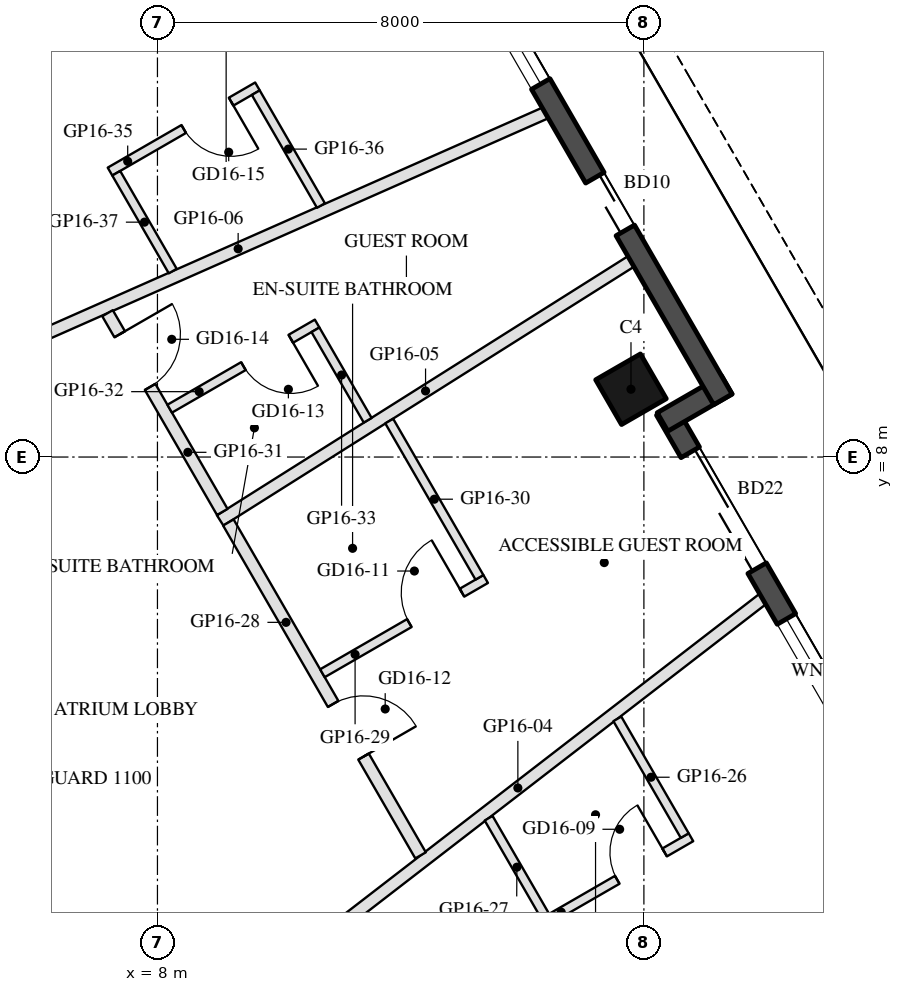
"""IFC4 building model, lengths in metres.
Left out: names, types, materials, properties, quantities, classifications, styles, units other than length and angle.
Written with IfcOpenShell. Run it as: python <this file> out.ifc"""

import sys

from ifc_helpers import new_model, si_unit, direction, frame, frame_2d, origin, origin_2d, place, context, subcontext, project, spatial, rectangle, hollow_rectangle, extrude, element, fill, save


model = new_model("IFC4")
c1 = context("Model", 3, precision=1e-05, world=origin(), true_north=direction((0.0, 1.0)))
c2 = subcontext(c1, "Body", "Model", "MODEL_VIEW")
j1 = project(units=[si_unit("LENGTHUNIT", "METRE"), si_unit("PLANEANGLEUNIT", "RADIAN")], contexts=[c1])
p1 = place(None, origin())
s1 = spatial("IfcSite", under=j1, at=p1, CompositionType="ELEMENT")
p2 = place(p1, origin())
s2 = spatial("IfcBuilding", under=s1, at=p2, CompositionType="ELEMENT")
p3 = place(p2, frame((0.0, 0.0, 179.9)))
s3 = spatial("IfcBuildingStorey", under=s2, at=p3, CompositionType="ELEMENT", Elevation=179.9)
p4 = place(p3, frame((15.788, 9.115, 0.0), z_axis=(0.0, 0.0, 1.0), x_axis=(-0.5, 0.866025403784, 0.0)))
e1 = element("IfcColumn", 1, at=p4, inside=s3, PredefinedType="COLUMN", context=c2, shape_type="SweptSolid", body=[
    extrude(hollow_rectangle(XDim=0.85, YDim=0.85, WallThickness=0.04, at=origin_2d()), origin(), (0.0, 0.0, 1.0), 3.7),
])
p5 = place(p3, frame((19.729, 2.938, 0.0), z_axis=(0.0, 0.0, 1.0), x_axis=(-0.499976430342, 0.866039011305, 0.0)))
e2 = element("IfcWall", 2, at=p5, inside=s3, PredefinedType="SOLIDWALL", context=c2, shape_type="SweptSolid", body=[
    extrude(rectangle(XDim=6.74, YDim=0.35, at=frame_2d((3.37, 0.0))), origin(), (0.0, 0.0, 1.0), 3.55),
])
p6 = place(p5, frame((0.77, 0.0, 0.3)))
e3 = element("IfcOpeningElement", 3, at=p6, cuts=e2, PredefinedType="OPENING", context=c2, shape_type="SweptSolid", body=[
    extrude(rectangle(XDim=2.0, YDim=2.65, at=frame_2d((1.0, 1.325))), frame((0.0, 0.185, 0.0), z_axis=(0.0, -1.0, 0.0), x_axis=(1.0, 0.0, 0.0)), (0.0, 0.0, 1.0), 0.37),
])
p7 = place(p5, frame((3.734, 0.0, 0.0)))
e4 = element("IfcOpeningElement", 4, at=p7, cuts=e2, PredefinedType="OPENING", context=c2, shape_type="SweptSolid", body=[
    extrude(rectangle(XDim=2.2, YDim=2.4, at=frame_2d((1.1, 1.2))), frame((0.0, 0.185, 0.0), z_axis=(0.0, -1.0, 0.0), x_axis=(1.0, 0.0, 0.0)), (0.0, 0.0, 1.0), 0.37),
])
p8 = place(p3, frame((16.306, 8.577, 0.0), z_axis=(0.0, 0.0, 1.0), x_axis=(0.866092288191, 0.499884134912, 0.0)))
e5 = element("IfcWall", 5, at=p8, inside=s3, PredefinedType="SOLIDWALL", context=c2, shape_type="SweptSolid", body=[
    extrude(rectangle(XDim=1.22, YDim=0.35, at=frame_2d((0.61, 0.0))), origin(), (0.0, 0.0, 1.0), 3.55),
])
p9 = place(p3, frame((17.299, 8.948, 0.0), z_axis=(0.0, 0.0, 1.0), x_axis=(-0.500010041276, 0.866019606374, 0.0)))
e6 = element("IfcWall", 6, at=p9, inside=s3, PredefinedType="SOLIDWALL", context=c2, shape_type="SweptSolid", body=[
    extrude(rectangle(XDim=9.7, YDim=0.35, at=frame_2d((4.85, 0.0))), origin(), (0.0, 0.0, 1.0), 3.55),
])
p10 = place(p9, frame((3.21, 0.0, 0.0)))
e7 = element("IfcOpeningElement", 7, at=p10, cuts=e6, PredefinedType="OPENING", context=c2, shape_type="SweptSolid", body=[
    extrude(rectangle(XDim=1.0, YDim=2.4, at=frame_2d((0.5, 1.2))), frame((0.0, 0.185, 0.0), z_axis=(0.0, -1.0, 0.0), x_axis=(1.0, 0.0, 0.0)), (0.0, 0.0, 1.0), 0.37),
])
p11 = place(p9, frame((5.99, 0.0, 0.3)))
e8 = element("IfcOpeningElement", 8, at=p11, cuts=e6, PredefinedType="OPENING", context=c2, shape_type="SweptSolid", body=[
    extrude(rectangle(XDim=2.0, YDim=2.65, at=frame_2d((1.0, 1.325))), frame((0.0, 0.185, 0.0), z_axis=(0.0, -1.0, 0.0), x_axis=(1.0, 0.0, 0.0)), (0.0, 0.0, 1.0), 0.37),
])
p12 = place(p3, frame((17.953, 5.664, 0.0), z_axis=(0.0, 0.0, 1.0), x_axis=(-0.791642262136, -0.610984884264, 0.0)))
e9 = element("IfcWall", 9, at=p12, inside=s3, PredefinedType="PARTITIONING", context=c2, shape_type="SweptSolid", body=[
    extrude(rectangle(XDim=10.171, YDim=0.2, at=frame_2d((5.085, 0.0))), origin(), (0.0, 0.0, 1.0), 2.95),
])
p13 = place(p3, frame((15.787, 11.216, 0.0), z_axis=(0.0, 0.0, 1.0), x_axis=(-0.845894721315, -0.533349904332, 0.0)))
e10 = element("IfcWall", 10, at=p13, inside=s3, PredefinedType="PARTITIONING", context=c2, shape_type="SweptSolid", body=[
    extrude(rectangle(XDim=7.986, YDim=0.2, at=frame_2d((3.993, 0.0))), origin(), (0.0, 0.0, 1.0), 3.06),
])
p14 = place(p3, frame((14.377, 13.658, 0.0), z_axis=(0.0, 0.0, 1.0), x_axis=(-0.914546661299, -0.404480412762, 0.0)))
e11 = element("IfcWall", 11, at=p14, inside=s3, PredefinedType="PARTITIONING", context=c2, shape_type="SweptSolid", body=[
    extrude(rectangle(XDim=11.043, YDim=0.2, at=frame_2d((5.521, 0.0))), origin(), (0.0, 0.0, 1.0), 3.06),
])
p15 = place(p3, frame((14.349, 0.347, 0.0), z_axis=(0.0, 0.0, 1.0), x_axis=(0.866034573852, 0.49998411664, 0.0)))
e12 = element("IfcWall", 12, at=p15, inside=s3, PredefinedType="PARTITIONING", context=c2, shape_type="SweptSolid", body=[
    extrude(rectangle(XDim=2.8, YDim=0.15, at=frame_2d((1.4, 0.0))), origin(), (0.0, 0.0, 1.0), 3.55),
])
p16 = place(p15, frame((1.4, 0.0, 0.0)))
e13 = element("IfcOpeningElement", 13, at=p16, cuts=e12, PredefinedType="OPENING", context=c2, shape_type="SweptSolid", body=[
    extrude(rectangle(XDim=0.9, YDim=2.1, at=frame_2d((0.45, 1.05))), frame((0.0, 0.085, 0.0), z_axis=(0.0, -1.0, 0.0), x_axis=(1.0, 0.0, 0.0)), (0.0, 0.0, 1.0), 0.17),
])
p17 = place(p3, frame((16.671, 1.774, 0.0), z_axis=(0.0, 0.0, 1.0), x_axis=(-0.499941746681, 0.866059033742, 0.0)))
e14 = element("IfcWall", 14, at=p17, inside=s3, PredefinedType="PARTITIONING", context=c2, shape_type="SweptSolid", body=[
    extrude(rectangle(XDim=2.217, YDim=0.15, at=frame_2d((1.108, 0.0))), origin(), (0.0, 0.0, 1.0), 3.55),
])
p18 = place(p3, frame((14.377, 0.449, 0.0), z_axis=(0.0, 0.0, 1.0), x_axis=(-0.500063286585, 0.865988862174, 0.0)))
e15 = element("IfcWall", 15, at=p18, inside=s3, PredefinedType="PARTITIONING", context=c2, shape_type="SweptSolid", body=[
    extrude(rectangle(XDim=1.86, YDim=0.15, at=frame_2d((0.93, 0.0))), origin(), (0.0, 0.0, 1.0), 3.55),
])
p19 = place(p3, frame((9.166, 6.924, 0.0), z_axis=(0.0, 0.0, 1.0), x_axis=(0.499997689051, -0.866026738007, 0.0)))
e16 = element("IfcWall", 16, at=p19, inside=s3, PredefinedType="PARTITIONING", context=c2, shape_type="SweptSolid", body=[
    extrude(rectangle(XDim=6.322, YDim=0.2, at=frame_2d((3.161, 0.0))), origin(), (0.0, 0.0, 1.0), 2.95),
])
p20 = place(p19, frame((3.446, 0.0, 0.0)))
e17 = element("IfcOpeningElement", 17, at=p20, cuts=e16, PredefinedType="OPENING", context=c2, shape_type="SweptSolid", body=[
    extrude(rectangle(XDim=1.0, YDim=2.1, at=frame_2d((0.5, 1.05))), frame((0.0, 0.11, 0.0), z_axis=(0.0, -1.0, 0.0), x_axis=(1.0, 0.0, 0.0)), (0.0, 0.0, 1.0), 0.22),
])
p21 = place(p3, frame((10.713, 4.444, 0.0), z_axis=(0.0, 0.0, 1.0), x_axis=(0.86602952684, 0.49999285859, 0.0)))
e18 = element("IfcWall", 18, at=p21, inside=s3, PredefinedType="PARTITIONING", context=c2, shape_type="SweptSolid", body=[
    extrude(rectangle(XDim=3.1, YDim=0.15, at=frame_2d((1.55, 0.0))), origin(), (0.0, 0.0, 1.0), 3.55),
])
p22 = place(p21, frame((1.65, 0.0, 0.0)))
e19 = element("IfcOpeningElement", 19, at=p22, cuts=e18, PredefinedType="OPENING", context=c2, shape_type="SweptSolid", body=[
    extrude(rectangle(XDim=1.0, YDim=2.1, at=frame_2d((0.5, 1.05))), frame((0.0, 0.085, 0.0), z_axis=(0.0, -1.0, 0.0), x_axis=(1.0, 0.0, 0.0)), (0.0, 0.0, 1.0), 0.17),
])
p23 = place(p3, frame((13.296, 6.021, 0.0), z_axis=(0.0, 0.0, 1.0), x_axis=(-0.499978799242, 0.866037643702, 0.0)))
e20 = element("IfcWall", 20, at=p23, inside=s3, PredefinedType="PARTITIONING", context=c2, shape_type="SweptSolid", body=[
    extrude(rectangle(XDim=2.968, YDim=0.15, at=frame_2d((1.484, 0.0))), origin(), (0.0, 0.0, 1.0), 2.95),
])
p24 = place(p3, frame((7.179, 10.365, 0.0), z_axis=(0.0, 0.0, 1.0), x_axis=(0.500021083992, -0.866013230594, 0.0)))
e21 = element("IfcWall", 21, at=p24, inside=s3, PredefinedType="PARTITIONING", context=c2, shape_type="SweptSolid", body=[
    extrude(rectangle(XDim=3.774, YDim=0.2, at=frame_2d((1.887, 0.0))), origin(), (0.0, 0.0, 1.0), 2.95),
])
p25 = place(p24, frame((0.4, 0.0, 0.0)))
e22 = element("IfcOpeningElement", 22, at=p25, cuts=e21, PredefinedType="OPENING", context=c2, shape_type="SweptSolid", body=[
    extrude(rectangle(XDim=1.0, YDim=2.1, at=frame_2d((0.5, 1.05))), frame((0.0, 0.11, 0.0), z_axis=(0.0, -1.0, 0.0), x_axis=(1.0, 0.0, 0.0)), (0.0, 0.0, 1.0), 0.22),
])
p26 = place(p3, frame((10.626, 10.195, 0.0), z_axis=(0.0, 0.0, 1.0), x_axis=(-0.865996816683, -0.500049511043, 0.0)))
e23 = element("IfcWall", 23, at=p26, inside=s3, PredefinedType="PARTITIONING", context=c2, shape_type="SweptSolid", body=[
    extrude(rectangle(XDim=2.8, YDim=0.15, at=frame_2d((1.4, 0.0))), origin(), (0.0, 0.0, 1.0), 3.55),
])
p27 = place(p26, frame((0.5, 0.0, 0.0)))
e24 = element("IfcOpeningElement", 24, at=p27, cuts=e23, PredefinedType="OPENING", context=c2, shape_type="SweptSolid", body=[
    extrude(rectangle(XDim=0.9, YDim=2.1, at=frame_2d((0.45, 1.05))), frame((0.0, 0.085, 0.0), z_axis=(0.0, -1.0, 0.0), x_axis=(1.0, 0.0, 0.0)), (0.0, 0.0, 1.0), 0.17),
])
p28 = place(p3, frame((11.458, 8.605, 0.0), z_axis=(0.0, 0.0, 1.0), x_axis=(-0.499898763811, 0.866083844636, 0.0)))
e25 = element("IfcWall", 25, at=p28, inside=s3, PredefinedType="PARTITIONING", context=c2, shape_type="SweptSolid", body=[
    extrude(rectangle(XDim=1.718, YDim=0.15, at=frame_2d((0.859, 0.0))), origin(), (0.0, 0.0, 1.0), 3.55),
])
p29 = place(p3, frame((9.645, 14.095, 0.0), z_axis=(0.0, 0.0, 1.0), x_axis=(-0.865996816683, -0.500049511043, 0.0)))
e26 = element("IfcWall", 26, at=p29, inside=s3, PredefinedType="PARTITIONING", context=c2, shape_type="SweptSolid", body=[
    extrude(rectangle(XDim=2.8, YDim=0.15, at=frame_2d((1.4, 0.0))), origin(), (0.0, 0.0, 1.0), 3.55),
])
p30 = place(p29, frame((0.5, 0.0, 0.0)))
e27 = element("IfcOpeningElement", 27, at=p30, cuts=e26, PredefinedType="OPENING", context=c2, shape_type="SweptSolid", body=[
    extrude(rectangle(XDim=0.9, YDim=2.1, at=frame_2d((0.45, 1.05))), frame((0.0, 0.085, 0.0), z_axis=(0.0, -1.0, 0.0), x_axis=(1.0, 0.0, 0.0)), (0.0, 0.0, 1.0), 0.17),
])
p31 = place(p3, frame((10.689, 12.136, 0.0), z_axis=(0.0, 0.0, 1.0), x_axis=(-0.499949244157, 0.866054705701, 0.0)))
e28 = element("IfcWall", 28, at=p31, inside=s3, PredefinedType="PARTITIONING", context=c2, shape_type="SweptSolid", body=[
    extrude(rectangle(XDim=2.143, YDim=0.15, at=frame_2d((1.072, 0.0))), origin(), (0.0, 0.0, 1.0), 3.55),
])
p32 = place(p3, frame((8.251, 11.059, 0.0), z_axis=(0.0, 0.0, 1.0), x_axis=(-0.500025795397, 0.866010510293, 0.0)))
e29 = element("IfcWall", 29, at=p32, inside=s3, PredefinedType="PARTITIONING", context=c2, shape_type="SweptSolid", body=[
    extrude(rectangle(XDim=1.858, YDim=0.15, at=frame_2d((0.929, 0.0))), origin(), (0.0, 0.0, 1.0), 3.55),
])
p33 = place(p6, origin())
e30 = element("IfcWindow", 30, at=p33, inside=s3, PartitioningType="SINGLE_PANEL", PredefinedType="WINDOW", context=c2, shape_type="SweptSolid", body=[
    extrude(rectangle(XDim=2.0, YDim=2.65, at=frame_2d((1.0, 1.325))), frame((0.0, 0.03, 0.0), z_axis=(0.0, -1.0, 0.0), x_axis=(1.0, 0.0, 0.0)), (0.0, 0.0, 1.0), 0.06),
])
fill(e3, e30)
p34 = place(p7, frame((2.2, 0.0, 0.0), z_axis=(0.0, 0.0, 1.0), x_axis=(-1.0, 0.0, 0.0)))
e31 = element("IfcDoor", 31, at=p34, inside=s3, OperationType="SLIDING_TO_LEFT", PredefinedType="DOOR", context=c2, shape_type="SweptSolid", body=[
    extrude(rectangle(XDim=2.2, YDim=2.4, at=frame_2d((1.1, 1.2))), frame((0.0, 0.025, 0.0), z_axis=(0.0, -1.0, 0.0), x_axis=(1.0, 0.0, 0.0)), (0.0, 0.0, 1.0), 0.05),
])
fill(e4, e31)
p35 = place(p10, frame((1.0, 0.0, 0.0), z_axis=(0.0, 0.0, 1.0), x_axis=(-1.0, 0.0, 0.0)))
e32 = element("IfcDoor", 32, at=p35, inside=s3, OperationType="SLIDING_TO_LEFT", PredefinedType="DOOR", context=c2, shape_type="SweptSolid", body=[
    extrude(rectangle(XDim=1.0, YDim=2.4, at=frame_2d((0.5, 1.2))), frame((0.0, 0.025, 0.0), z_axis=(0.0, -1.0, 0.0), x_axis=(1.0, 0.0, 0.0)), (0.0, 0.0, 1.0), 0.05),
])
fill(e7, e32)
p36 = place(p11, origin())
e33 = element("IfcWindow", 33, at=p36, inside=s3, PartitioningType="SINGLE_PANEL", PredefinedType="WINDOW", context=c2, shape_type="SweptSolid", body=[
    extrude(rectangle(XDim=2.0, YDim=2.65, at=frame_2d((1.0, 1.325))), frame((0.0, 0.03, 0.0), z_axis=(0.0, -1.0, 0.0), x_axis=(1.0, 0.0, 0.0)), (0.0, 0.0, 1.0), 0.06),
])
fill(e8, e33)
p37 = place(p16, origin())
e34 = element("IfcDoor", 34, at=p37, inside=s3, OperationType="SINGLE_SWING_RIGHT", PredefinedType="DOOR", context=c2, shape_type="SweptSolid", body=[
    extrude(rectangle(XDim=0.9, YDim=2.1, at=frame_2d((0.45, 1.05))), frame((0.0, 0.025, 0.0), z_axis=(0.0, -1.0, 0.0), x_axis=(1.0, 0.0, 0.0)), (0.0, 0.0, 1.0), 0.05),
])
fill(e13, e34)
p38 = place(p22, origin())
e35 = element("IfcDoor", 35, at=p38, inside=s3, OperationType="SINGLE_SWING_RIGHT", PredefinedType="DOOR", context=c2, shape_type="SweptSolid", body=[
    extrude(rectangle(XDim=1.0, YDim=2.1, at=frame_2d((0.5, 1.05))), frame((0.0, 0.025, 0.0), z_axis=(0.0, -1.0, 0.0), x_axis=(1.0, 0.0, 0.0)), (0.0, 0.0, 1.0), 0.05),
])
fill(e19, e35)
p39 = place(p20, origin())
e36 = element("IfcDoor", 36, at=p39, inside=s3, OperationType="SINGLE_SWING_RIGHT", PredefinedType="DOOR", context=c2, shape_type="SweptSolid", body=[
    extrude(rectangle(XDim=1.0, YDim=2.1, at=frame_2d((0.5, 1.05))), frame((0.0, 0.025, 0.0), z_axis=(0.0, -1.0, 0.0), x_axis=(1.0, 0.0, 0.0)), (0.0, 0.0, 1.0), 0.05),
])
fill(e17, e36)
p40 = place(p27, origin())
e37 = element("IfcDoor", 37, at=p40, inside=s3, OperationType="SINGLE_SWING_LEFT", PredefinedType="DOOR", context=c2, shape_type="SweptSolid", body=[
    extrude(rectangle(XDim=0.9, YDim=2.1, at=frame_2d((0.45, 1.05))), frame((0.0, 0.025, 0.0), z_axis=(0.0, -1.0, 0.0), x_axis=(1.0, 0.0, 0.0)), (0.0, 0.0, 1.0), 0.05),
])
fill(e24, e37)
p41 = place(p25, origin())
e38 = element("IfcDoor", 38, at=p41, inside=s3, OperationType="SINGLE_SWING_LEFT", PredefinedType="DOOR", context=c2, shape_type="SweptSolid", body=[
    extrude(rectangle(XDim=1.0, YDim=2.1, at=frame_2d((0.5, 1.05))), frame((0.0, 0.025, 0.0), z_axis=(0.0, -1.0, 0.0), x_axis=(1.0, 0.0, 0.0)), (0.0, 0.0, 1.0), 0.05),
])
fill(e22, e38)
p42 = place(p30, origin())
e39 = element("IfcDoor", 39, at=p42, inside=s3, OperationType="SINGLE_SWING_LEFT", PredefinedType="DOOR", context=c2, shape_type="SweptSolid", body=[
    extrude(rectangle(XDim=0.9, YDim=2.1, at=frame_2d((0.45, 1.05))), frame((0.0, 0.025, 0.0), z_axis=(0.0, -1.0, 0.0), x_axis=(1.0, 0.0, 0.0)), (0.0, 0.0, 1.0), 0.05),
])
fill(e27, e39)
save(model, sys.argv[1])
